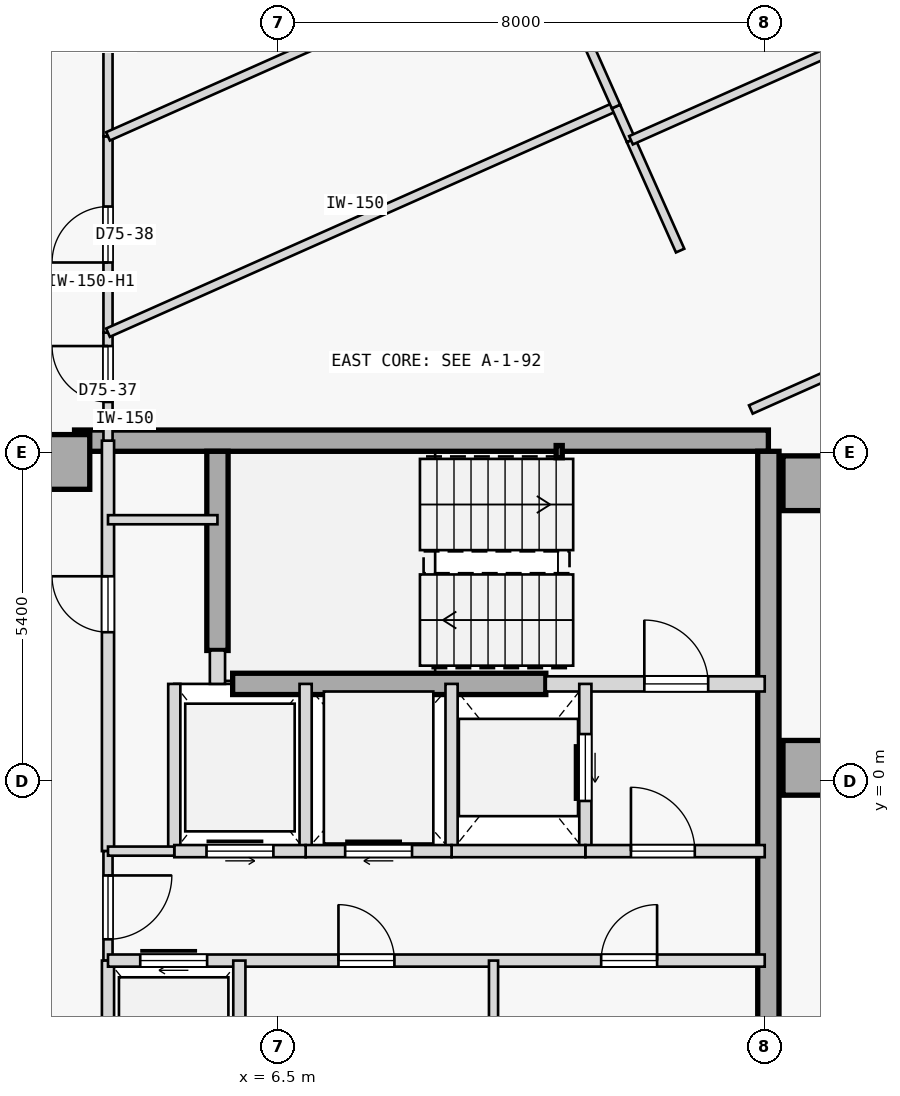
"""IFC4 building model, lengths in metres.
Left out: names, types, materials, properties, quantities, classifications, styles, units other than length and angle.
Written with IfcOpenShell. Run it as: python <this file> out.ifc"""

import sys

from ifc_helpers import new_model, si_unit, direction, frame, frame_2d, origin, origin_2d, place, context, subcontext, project, spatial, rectangle, hollow_rectangle, extrude, element, fill, save


model = new_model("IFC4")
c1 = context("Model", 3, precision=1e-05, world=origin(), true_north=direction((0.0, 1.0)))
c2 = subcontext(c1, "Body", "Model", "MODEL_VIEW")
j1 = project(units=[si_unit("LENGTHUNIT", "METRE"), si_unit("PLANEANGLEUNIT", "RADIAN")], contexts=[c1])
p1 = place(None, origin())
s1 = spatial("IfcSite", under=j1, at=p1, CompositionType="ELEMENT")
p2 = place(p1, origin())
s2 = spatial("IfcBuilding", under=s1, at=p2, CompositionType="ELEMENT")
p3 = place(p2, frame((0.0, 0.0, 281.9)))
s3 = spatial("IfcBuildingStorey", under=s2, at=p3, CompositionType="ELEMENT", Elevation=281.9)
for number, where, z_axis, x_axis in (
    (1, (15.25, 4.9, 0.0), (0.0, 0.0, 1.0), (1.0, 0.0, 0.0)),
    (2, (15.25, 0.22, 0.0), (0.0, 0.0, 1.0), (1.0, 0.0, 0.0)),
    (3, (2.95, 5.25, 0.0), (0.0, 0.0, 1.0), (1.0, 0.0, 0.0)),
):
    element("IfcColumn", number, at=place(p3, frame(where, z_axis=z_axis, x_axis=x_axis)), inside=s3, PredefinedType="COLUMN", context=c2, shape_type="SweptSolid", body=[
        extrude(rectangle(XDim=0.9, YDim=0.9, at=origin_2d()), origin(), (0.0, 0.0, 1.0), 3.35),
    ])
p4 = place(p3, frame((3.15, 5.6, 0.0), z_axis=(0.0, 0.0, 1.0), x_axis=(1.0, 0.0, 0.0)))
e4 = element("IfcWall", 4, at=p4, inside=s3, PredefinedType="SHEAR", context=c2, shape_type="SweptSolid", body=[
    extrude(rectangle(XDim=11.41, YDim=0.35, at=frame_2d((5.705, 0.0))), origin(), (0.0, 0.0, 1.0), 3.125),
])
p5 = place(p3, frame((14.56, -5.425, 0.0), z_axis=(0.0, 0.0, 1.0), x_axis=(0.0, 1.0, 0.0)))
e5 = element("IfcWall", 5, at=p5, inside=s3, PredefinedType="SHEAR", context=c2, shape_type="SweptSolid", body=[
    extrude(rectangle(XDim=10.85, YDim=0.35, at=frame_2d((5.425, 0.0))), origin(), (0.0, 0.0, 1.0), 3.125),
])
p6 = place(p3, frame((5.5, 2.15, 0.0), z_axis=(0.0, 0.0, 1.0), x_axis=(0.0, 1.0, 0.0)))
e6 = element("IfcWall", 6, at=p6, inside=s3, PredefinedType="SHEAR", context=c2, shape_type="SweptSolid", body=[
    extrude(rectangle(XDim=3.275, YDim=0.35, at=frame_2d((1.638, 0.0))), origin(), (0.0, 0.0, 1.0), 3.125),
])
p7 = place(p3, frame((5.75, 1.6, 0.0), z_axis=(0.0, 0.0, 1.0), x_axis=(1.0, 0.0, 0.0)))
e7 = element("IfcWall", 7, at=p7, inside=s3, PredefinedType="SHEAR", context=c2, shape_type="SweptSolid", body=[
    extrude(rectangle(XDim=5.15, YDim=0.35, at=frame_2d((2.575, 0.0))), origin(), (0.0, 0.0, 1.0), 3.125),
])
p8 = place(p3, frame((11.12, 5.42, 0.0), z_axis=(0.0, 0.0, 1.0), x_axis=(1.0, 0.0, 0.0)))
e8 = element("IfcColumn", 8, at=p8, inside=s3, PredefinedType="COLUMN", context=c2, shape_type="SweptSolid", body=[
    extrude(hollow_rectangle(XDim=0.1, YDim=0.2, WallThickness=0.008, at=origin_2d()), origin(), (0.0, 0.0, 1.0), 3.35),
])
p9 = place(p3, frame((10.9, 1.6, 0.0), z_axis=(0.0, 0.0, 1.0), x_axis=(1.0, 0.0, 0.0)))
e9 = element("IfcWall", 9, at=p9, inside=s3, PredefinedType="STANDARD", context=c2, shape_type="SweptSolid", body=[
    extrude(rectangle(XDim=3.6, YDim=0.25, at=frame_2d((1.8, 0.0))), origin(), (0.0, 0.0, 1.0), 3.125),
])
p10 = place(p9, frame((1.62, 0.0, 0.0)))
e10 = element("IfcOpeningElement", 10, at=p10, cuts=e9, PredefinedType="OPENING", context=c2, shape_type="SweptSolid", body=[
    extrude(rectangle(XDim=1.05, YDim=2.15, at=frame_2d((0.525, 1.075))), frame((0.0, 0.135, 0.0), z_axis=(0.0, -1.0, 0.0), x_axis=(1.0, 0.0, 0.0)), (0.0, 0.0, 1.0), 0.27),
])
p11 = place(p3, frame((5.5, 1.6, 0.0), z_axis=(0.0, 0.0, 1.0), x_axis=(0.0, 1.0, 0.0)))
e11 = element("IfcWall", 11, at=p11, inside=s3, PredefinedType="STANDARD", context=c2, shape_type="SweptSolid", body=[
    extrude(rectangle(XDim=0.55, YDim=0.25, at=frame_2d((0.275, 0.0))), origin(), (0.0, 0.0, 1.0), 3.125),
])
p12 = place(p3, frame((3.7, -1.15, 0.0), z_axis=(0.0, 0.0, 1.0), x_axis=(0.0, 1.0, 0.0)))
e12 = element("IfcWall", 12, at=p12, inside=s3, PredefinedType="STANDARD", context=c2, shape_type="SweptSolid", body=[
    extrude(rectangle(XDim=6.75, YDim=0.2, at=frame_2d((3.375, 0.0))), origin(), (0.0, 0.0, 1.0), 3.125),
])
p13 = place(p12, frame((3.6, 0.0, 0.0)))
e13 = element("IfcOpeningElement", 13, at=p13, cuts=e12, PredefinedType="OPENING", context=c2, shape_type="SweptSolid", body=[
    extrude(rectangle(XDim=0.92, YDim=2.15, at=frame_2d((0.46, 1.075))), frame((0.0, 0.11, 0.0), z_axis=(0.0, -1.0, 0.0), x_axis=(1.0, 0.0, 0.0)), (0.0, 0.0, 1.0), 0.22),
])
p14 = place(p3, frame((3.7, -2.95, 0.0), z_axis=(0.0, 0.0, 1.0), x_axis=(0.0, 1.0, 0.0)))
e14 = element("IfcWall", 14, at=p14, inside=s3, PredefinedType="PARTITIONING", context=c2, shape_type="SweptSolid", body=[
    extrude(rectangle(XDim=1.8, YDim=0.15, at=frame_2d((0.9, 0.0))), origin(), (0.0, 0.0, 1.0), 3.125),
])
p15 = place(p14, frame((0.35, 0.0, 0.0)))
e15 = element("IfcOpeningElement", 15, at=p15, cuts=e14, PredefinedType="OPENING", context=c2, shape_type="SweptSolid", body=[
    extrude(rectangle(XDim=1.05, YDim=2.18, at=frame_2d((0.525, 1.09))), frame((0.0, 0.085, 0.0), z_axis=(0.0, -1.0, 0.0), x_axis=(1.0, 0.0, 0.0)), (0.0, 0.0, 1.0), 0.17),
])
p16 = place(p3, frame((3.7, -5.6, 0.0), z_axis=(0.0, 0.0, 1.0), x_axis=(0.0, 1.0, 0.0)))
e16 = element("IfcWall", 16, at=p16, inside=s3, PredefinedType="STANDARD", context=c2, shape_type="SweptSolid", body=[
    extrude(rectangle(XDim=2.65, YDim=0.2, at=frame_2d((1.325, 0.0))), origin(), (0.0, 0.0, 1.0), 3.125),
])
p17 = place(p3, frame((11.55, -1.15, 0.0), z_axis=(0.0, 0.0, 1.0), x_axis=(0.0, 1.0, 0.0)))
e17 = element("IfcWall", 17, at=p17, inside=s3, PredefinedType="STANDARD", context=c2, shape_type="SweptSolid", body=[
    extrude(rectangle(XDim=2.75, YDim=0.2, at=frame_2d((1.375, 0.0))), origin(), (0.0, 0.0, 1.0), 3.125),
])
p18 = place(p17, frame((0.825, 0.0, 0.0)))
e18 = element("IfcOpeningElement", 18, at=p18, cuts=e17, PredefinedType="OPENING", context=c2, shape_type="SweptSolid", body=[
    extrude(rectangle(XDim=1.1, YDim=2.15, at=frame_2d((0.55, 1.075))), frame((0.0, 0.11, 0.0), z_axis=(0.0, -1.0, 0.0), x_axis=(1.0, 0.0, 0.0)), (0.0, 0.0, 1.0), 0.22),
])
p19 = place(p3, frame((9.35, -1.15, 0.0), z_axis=(0.0, 0.0, 1.0), x_axis=(0.0, 1.0, 0.0)))
e19 = element("IfcWall", 19, at=p19, inside=s3, PredefinedType="STANDARD", context=c2, shape_type="SweptSolid", body=[
    extrude(rectangle(XDim=2.75, YDim=0.2, at=frame_2d((1.375, 0.0))), origin(), (0.0, 0.0, 1.0), 3.125),
])
p20 = place(p3, frame((11.55, -1.15, 0.0), z_axis=(0.0, 0.0, 1.0), x_axis=(1.0, 0.0, 0.0)))
e20 = element("IfcWall", 20, at=p20, inside=s3, PredefinedType="STANDARD", context=c2, shape_type="SweptSolid", body=[
    extrude(rectangle(XDim=2.95, YDim=0.2, at=frame_2d((1.475, 0.0))), origin(), (0.0, 0.0, 1.0), 3.125),
])
p21 = place(p20, frame((0.75, 0.0, 0.0)))
e21 = element("IfcOpeningElement", 21, at=p21, cuts=e20, PredefinedType="OPENING", context=c2, shape_type="SweptSolid", body=[
    extrude(rectangle(XDim=1.05, YDim=2.18, at=frame_2d((0.525, 1.09))), frame((0.0, 0.11, 0.0), z_axis=(0.0, -1.0, 0.0), x_axis=(1.0, 0.0, 0.0)), (0.0, 0.0, 1.0), 0.22),
])
p22 = place(p3, frame((9.35, -1.15, 0.0), z_axis=(0.0, 0.0, 1.0), x_axis=(1.0, 0.0, 0.0)))
e22 = element("IfcWall", 22, at=p22, inside=s3, PredefinedType="STANDARD", context=c2, shape_type="SweptSolid", body=[
    extrude(rectangle(XDim=2.2, YDim=0.2, at=frame_2d((1.1, 0.0))), origin(), (0.0, 0.0, 1.0), 3.125),
])
p23 = place(p3, frame((6.95, -1.15, 0.0), z_axis=(0.0, 0.0, 1.0), x_axis=(0.0, 1.0, 0.0)))
e23 = element("IfcWall", 23, at=p23, inside=s3, PredefinedType="STANDARD", context=c2, shape_type="SweptSolid", body=[
    extrude(rectangle(XDim=2.75, YDim=0.2, at=frame_2d((1.375, 0.0))), origin(), (0.0, 0.0, 1.0), 3.125),
])
p24 = place(p3, frame((6.95, -1.15, 0.0), z_axis=(0.0, 0.0, 1.0), x_axis=(1.0, 0.0, 0.0)))
e24 = element("IfcWall", 24, at=p24, inside=s3, PredefinedType="STANDARD", context=c2, shape_type="SweptSolid", body=[
    extrude(rectangle(XDim=2.4, YDim=0.2, at=frame_2d((1.2, 0.0))), origin(), (0.0, 0.0, 1.0), 3.125),
])
p25 = place(p24, frame((0.65, 0.0, 0.0)))
e25 = element("IfcOpeningElement", 25, at=p25, cuts=e24, PredefinedType="OPENING", context=c2, shape_type="SweptSolid", body=[
    extrude(rectangle(XDim=1.1, YDim=2.15, at=frame_2d((0.55, 1.075))), frame((0.0, 0.11, 0.0), z_axis=(0.0, -1.0, 0.0), x_axis=(1.0, 0.0, 0.0)), (0.0, 0.0, 1.0), 0.22),
])
p26 = place(p3, frame((4.79, -1.15, 0.0), z_axis=(0.0, 0.0, 1.0), x_axis=(0.0, 1.0, 0.0)))
e26 = element("IfcWall", 26, at=p26, inside=s3, PredefinedType="STANDARD", context=c2, shape_type="SweptSolid", body=[
    extrude(rectangle(XDim=2.75, YDim=0.2, at=frame_2d((1.375, 0.0))), origin(), (0.0, 0.0, 1.0), 3.125),
])
p27 = place(p3, frame((4.79, -1.15, 0.0), z_axis=(0.0, 0.0, 1.0), x_axis=(1.0, 0.0, 0.0)))
e27 = element("IfcWall", 27, at=p27, inside=s3, PredefinedType="STANDARD", context=c2, shape_type="SweptSolid", body=[
    extrude(rectangle(XDim=2.16, YDim=0.2, at=frame_2d((1.08, 0.0))), origin(), (0.0, 0.0, 1.0), 3.125),
])
p28 = place(p27, frame((0.53, 0.0, 0.0)))
e28 = element("IfcOpeningElement", 28, at=p28, cuts=e27, PredefinedType="OPENING", context=c2, shape_type="SweptSolid", body=[
    extrude(rectangle(XDim=1.1, YDim=2.15, at=frame_2d((0.55, 1.075))), frame((0.0, 0.11, 0.0), z_axis=(0.0, -1.0, 0.0), x_axis=(1.0, 0.0, 0.0)), (0.0, 0.0, 1.0), 0.22),
])
p29 = place(p3, frame((3.7, -1.15, 0.0), z_axis=(0.0, 0.0, 1.0), x_axis=(1.0, 0.0, 0.0)))
e29 = element("IfcWall", 29, at=p29, inside=s3, PredefinedType="PARTITIONING", context=c2, shape_type="SweptSolid", body=[
    extrude(rectangle(XDim=1.09, YDim=0.15, at=frame_2d((0.545, 0.0))), origin(), (0.0, 0.0, 1.0), 3.125),
])
p30 = place(p3, frame((3.7, -2.95, 0.0), z_axis=(0.0, 0.0, 1.0), x_axis=(1.0, 0.0, 0.0)))
e30 = element("IfcWall", 30, at=p30, inside=s3, PredefinedType="STANDARD", context=c2, shape_type="SweptSolid", body=[
    extrude(rectangle(XDim=10.8, YDim=0.2, at=frame_2d((5.4, 0.0))), origin(), (0.0, 0.0, 1.0), 3.125),
])
p31 = place(p30, frame((0.53, 0.0, 0.0)))
e31 = element("IfcOpeningElement", 31, at=p31, cuts=e30, PredefinedType="OPENING", context=c2, shape_type="SweptSolid", body=[
    extrude(rectangle(XDim=1.1, YDim=2.15, at=frame_2d((0.55, 1.075))), frame((0.0, 0.11, 0.0), z_axis=(0.0, -1.0, 0.0), x_axis=(1.0, 0.0, 0.0)), (0.0, 0.0, 1.0), 0.22),
])
p32 = place(p30, frame((3.79, 0.0, 0.0)))
e32 = element("IfcOpeningElement", 32, at=p32, cuts=e30, PredefinedType="OPENING", context=c2, shape_type="SweptSolid", body=[
    extrude(rectangle(XDim=0.92, YDim=2.15, at=frame_2d((0.46, 1.075))), frame((0.0, 0.11, 0.0), z_axis=(0.0, -1.0, 0.0), x_axis=(1.0, 0.0, 0.0)), (0.0, 0.0, 1.0), 0.22),
])
p33 = place(p30, frame((8.11, 0.0, 0.0)))
e33 = element("IfcOpeningElement", 33, at=p33, cuts=e30, PredefinedType="OPENING", context=c2, shape_type="SweptSolid", body=[
    extrude(rectangle(XDim=0.92, YDim=2.15, at=frame_2d((0.46, 1.075))), frame((0.0, 0.11, 0.0), z_axis=(0.0, -1.0, 0.0), x_axis=(1.0, 0.0, 0.0)), (0.0, 0.0, 1.0), 0.22),
])
p34 = place(p3, frame((5.86, -5.6, 0.0), z_axis=(0.0, 0.0, 1.0), x_axis=(0.0, 1.0, 0.0)))
e34 = element("IfcWall", 34, at=p34, inside=s3, PredefinedType="STANDARD", context=c2, shape_type="SweptSolid", body=[
    extrude(rectangle(XDim=2.65, YDim=0.2, at=frame_2d((1.325, 0.0))), origin(), (0.0, 0.0, 1.0), 3.125),
])
p35 = place(p3, frame((10.04, -5.6, 0.0), z_axis=(0.0, 0.0, 1.0), x_axis=(0.0, 1.0, 0.0)))
e35 = element("IfcWall", 35, at=p35, inside=s3, PredefinedType="PARTITIONING", context=c2, shape_type="SweptSolid", body=[
    extrude(rectangle(XDim=2.65, YDim=0.15, at=frame_2d((1.325, 0.0))), origin(), (0.0, 0.0, 1.0), 3.125),
])
p36 = place(p3, frame((3.7, 4.3, 0.0), z_axis=(0.0, 0.0, 1.0), x_axis=(1.0, 0.0, 0.0)))
e36 = element("IfcWall", 36, at=p36, inside=s3, PredefinedType="PARTITIONING", context=c2, shape_type="SweptSolid", body=[
    extrude(rectangle(XDim=1.8, YDim=0.15, at=frame_2d((0.9, 0.0))), origin(), (0.0, 0.0, 1.0), 3.125),
])
p37 = place(p3, frame((3.7, 5.601, 0.0), z_axis=(0.0, 0.0, 1.0), x_axis=(0.0, 1.0, 0.0)))
e37 = element("IfcWall", 37, at=p37, inside=s3, PredefinedType="PARTITIONING", context=c2, shape_type="SweptSolid", body=[
    extrude(rectangle(XDim=1.775, YDim=0.15, at=frame_2d((0.888, 0.0))), origin(), (0.0, 0.0, 1.0), 3.125),
])
p38 = place(p37, frame((0.635, 0.0, 0.0)))
e38 = element("IfcOpeningElement", 38, at=p38, cuts=e37, PredefinedType="OPENING", context=c2, shape_type="SweptSolid", body=[
    extrude(rectangle(XDim=0.92, YDim=2.15, at=frame_2d((0.46, 1.075))), frame((0.0, 0.085, 0.0), z_axis=(0.0, -1.0, 0.0), x_axis=(1.0, 0.0, 0.0)), (0.0, 0.0, 1.0), 0.17),
])
p39 = place(p3, frame((3.7, 7.376, 0.0), z_axis=(0.0, 0.0, 1.0), x_axis=(0.0, 1.0, 0.0)))
e39 = element("IfcWall", 39, at=p39, inside=s3, PredefinedType="PARTITIONING", context=c2, shape_type="SweptSolid", body=[
    extrude(rectangle(XDim=3.228, YDim=0.15, at=frame_2d((1.614, 0.0))), origin(), (0.0, 0.0, 1.0), 2.675),
])
p40 = place(p39, frame((1.154, 0.0, 0.0)))
e40 = element("IfcOpeningElement", 40, at=p40, cuts=e39, PredefinedType="OPENING", context=c2, shape_type="SweptSolid", body=[
    extrude(rectangle(XDim=0.92, YDim=2.15, at=frame_2d((0.46, 1.075))), frame((0.0, 0.085, 0.0), z_axis=(0.0, -1.0, 0.0), x_axis=(1.0, 0.0, 0.0)), (0.0, 0.0, 1.0), 0.17),
])
p41 = place(p3, frame((3.7, 10.604, 0.0), z_axis=(0.0, 0.0, 1.0), x_axis=(-0.000157567161, 0.999999987586, 0.0)))
e41 = element("IfcWall", 41, at=p41, inside=s3, PredefinedType="PARTITIONING", context=c2, shape_type="SweptSolid", body=[
    extrude(rectangle(XDim=3.099, YDim=0.15, at=frame_2d((1.549, 0.0))), origin(), (0.0, 0.0, 1.0), 2.675),
])
p42 = place(p3, frame((3.7, 7.376, 0.0), z_axis=(0.0, 0.0, 1.0), x_axis=(0.91354490899, 0.406737875367, 0.0)))
e42 = element("IfcWall", 42, at=p42, inside=s3, PredefinedType="PARTITIONING", context=c2, shape_type="SweptSolid", body=[
    extrude(rectangle(XDim=9.144, YDim=0.15, at=frame_2d((4.572, 0.0))), origin(), (0.0, 0.0, 1.0), 3.125),
])
p43 = place(p3, frame((13.109, 8.726, 0.0), z_axis=(0.0, 0.0, 1.0), x_axis=(-0.406788519224, 0.913522359128, 0.0)))
e43 = element("IfcWall", 43, at=p43, inside=s3, PredefinedType="PARTITIONING", context=c2, shape_type="SweptSolid", body=[
    extrude(rectangle(XDim=1.986, YDim=0.15, at=frame_2d((0.993, 0.0))), origin(), (0.0, 0.0, 1.0), 3.125),
])
p44 = place(p3, frame((12.301, 10.54, 0.0), z_axis=(0.0, 0.0, 1.0), x_axis=(-0.406436552015, 0.913679007741, 0.0)))
e44 = element("IfcWall", 44, at=p44, inside=s3, PredefinedType="PARTITIONING", context=c2, shape_type="SweptSolid", body=[
    extrude(rectangle(XDim=0.608, YDim=0.15, at=frame_2d((0.304, 0.0))), origin(), (0.0, 0.0, 1.0), 3.125),
])
p45 = place(p3, frame((3.7, 10.604, 0.0), z_axis=(0.0, 0.0, 1.0), x_axis=(0.913534926439, 0.406760295722, 0.0)))
e45 = element("IfcWall", 45, at=p45, inside=s3, PredefinedType="PARTITIONING", context=c2, shape_type="SweptSolid", body=[
    extrude(rectangle(XDim=7.831, YDim=0.15, at=frame_2d((3.916, 0.0))), origin(), (0.0, 0.0, 1.0), 3.125),
])
p46 = place(p3, frame((12.054, 11.095, 0.0), z_axis=(0.0, 0.0, 1.0), x_axis=(-0.406798922371, 0.91351772657, 0.0)))
e46 = element("IfcWall", 46, at=p46, inside=s3, PredefinedType="PARTITIONING", context=c2, shape_type="SweptSolid", body=[
    extrude(rectangle(XDim=2.949, YDim=0.15, at=frame_2d((1.475, 0.0))), origin(), (0.0, 0.0, 1.0), 3.125),
])
p47 = place(p3, frame((14.272, 6.113, 0.0), z_axis=(0.0, 0.0, 1.0), x_axis=(0.913551014388, 0.406724162191, 0.0)))
e47 = element("IfcWall", 47, at=p47, inside=s3, PredefinedType="PARTITIONING", context=c2, shape_type="SweptSolid", body=[
    extrude(rectangle(XDim=14.192, YDim=0.15, at=frame_2d((7.096, 0.0))), origin(), (0.0, 0.0, 1.0), 3.125),
])
p48 = place(p47, frame((6.636, 0.0, 0.0)))
e48 = element("IfcOpeningElement", 48, at=p48, cuts=e47, PredefinedType="OPENING", context=c2, shape_type="SweptSolid", body=[
    extrude(rectangle(XDim=0.92, YDim=2.15, at=frame_2d((0.46, 1.075))), frame((0.0, 0.085, 0.0), z_axis=(0.0, -1.0, 0.0), x_axis=(1.0, 0.0, 0.0)), (0.0, 0.0, 1.0), 0.17),
])
p49 = place(p3, frame((12.301, 10.54, 0.0), z_axis=(0.0, 0.0, 1.0), x_axis=(0.913544622417, 0.406738519018, 0.0)))
e49 = element("IfcWall", 49, at=p49, inside=s3, PredefinedType="PARTITIONING", context=c2, shape_type="SweptSolid", body=[
    extrude(rectangle(XDim=14.192, YDim=0.15, at=frame_2d((7.096, 0.0))), origin(), (0.0, 0.0, 1.0), 2.675),
])
p50 = place(p49, frame((6.636, 0.0, 0.0)))
e50 = element("IfcOpeningElement", 50, at=p50, cuts=e49, PredefinedType="OPENING", context=c2, shape_type="SweptSolid", body=[
    extrude(rectangle(XDim=0.92, YDim=2.15, at=frame_2d((0.46, 1.075))), frame((0.0, 0.085, 0.0), z_axis=(0.0, -1.0, 0.0), x_axis=(1.0, 0.0, 0.0)), (0.0, 0.0, 1.0), 0.17),
])
p51 = place(p10, origin())
e51 = element("IfcDoor", 51, at=p51, inside=s3, OperationType="SINGLE_SWING_LEFT", PredefinedType="DOOR", context=c2, shape_type="SweptSolid", body=[
    extrude(rectangle(XDim=1.05, YDim=2.15, at=frame_2d((0.525, 1.075))), frame((0.0, 0.025, 0.0), z_axis=(0.0, -1.0, 0.0), x_axis=(1.0, 0.0, 0.0)), (0.0, 0.0, 1.0), 0.05),
])
fill(e10, e51)
p52 = place(p21, origin())
e52 = element("IfcDoor", 52, at=p52, inside=s3, OperationType="SINGLE_SWING_LEFT", PredefinedType="DOOR", context=c2, shape_type="SweptSolid", body=[
    extrude(rectangle(XDim=1.05, YDim=2.18, at=frame_2d((0.525, 1.09))), frame((0.0, 0.025, 0.0), z_axis=(0.0, -1.0, 0.0), x_axis=(1.0, 0.0, 0.0)), (0.0, 0.0, 1.0), 0.05),
])
fill(e21, e52)
p53 = place(p15, frame((1.05, 0.0, 0.0), z_axis=(0.0, 0.0, 1.0), x_axis=(-1.0, 0.0, 0.0)))
e53 = element("IfcDoor", 53, at=p53, inside=s3, OperationType="SINGLE_SWING_RIGHT", PredefinedType="DOOR", context=c2, shape_type="SweptSolid", body=[
    extrude(rectangle(XDim=1.05, YDim=2.18, at=frame_2d((0.525, 1.09))), frame((0.0, 0.025, 0.0), z_axis=(0.0, -1.0, 0.0), x_axis=(1.0, 0.0, 0.0)), (0.0, 0.0, 1.0), 0.05),
])
fill(e15, e53)
p54 = place(p18, origin())
e54 = element("IfcDoor", 54, at=p54, inside=s3, OperationType="SLIDING_TO_RIGHT", PredefinedType="DOOR", context=c2, shape_type="SweptSolid", body=[
    extrude(rectangle(XDim=1.1, YDim=2.15, at=frame_2d((0.55, 1.075))), frame((0.0, 0.025, 0.0), z_axis=(0.0, -1.0, 0.0), x_axis=(1.0, 0.0, 0.0)), (0.0, 0.0, 1.0), 0.05),
])
fill(e18, e54)
p55 = place(p25, origin())
e55 = element("IfcDoor", 55, at=p55, inside=s3, OperationType="SLIDING_TO_RIGHT", PredefinedType="DOOR", context=c2, shape_type="SweptSolid", body=[
    extrude(rectangle(XDim=1.1, YDim=2.15, at=frame_2d((0.55, 1.075))), frame((0.0, 0.025, 0.0), z_axis=(0.0, -1.0, 0.0), x_axis=(1.0, 0.0, 0.0)), (0.0, 0.0, 1.0), 0.05),
])
fill(e25, e55)
p56 = place(p28, origin())
e56 = element("IfcDoor", 56, at=p56, inside=s3, OperationType="SLIDING_TO_LEFT", PredefinedType="DOOR", context=c2, shape_type="SweptSolid", body=[
    extrude(rectangle(XDim=1.1, YDim=2.15, at=frame_2d((0.55, 1.075))), frame((0.0, 0.025, 0.0), z_axis=(0.0, -1.0, 0.0), x_axis=(1.0, 0.0, 0.0)), (0.0, 0.0, 1.0), 0.05),
])
fill(e28, e56)
p57 = place(p31, origin())
e57 = element("IfcDoor", 57, at=p57, inside=s3, OperationType="SLIDING_TO_RIGHT", PredefinedType="DOOR", context=c2, shape_type="SweptSolid", body=[
    extrude(rectangle(XDim=1.1, YDim=2.15, at=frame_2d((0.55, 1.075))), frame((0.0, 0.025, 0.0), z_axis=(0.0, -1.0, 0.0), x_axis=(1.0, 0.0, 0.0)), (0.0, 0.0, 1.0), 0.05),
])
fill(e31, e57)
p58 = place(p32, origin())
e58 = element("IfcDoor", 58, at=p58, inside=s3, OperationType="SINGLE_SWING_LEFT", PredefinedType="DOOR", context=c2, shape_type="SweptSolid", body=[
    extrude(rectangle(XDim=0.92, YDim=2.15, at=frame_2d((0.46, 1.075))), frame((0.0, 0.025, 0.0), z_axis=(0.0, -1.0, 0.0), x_axis=(1.0, 0.0, 0.0)), (0.0, 0.0, 1.0), 0.05),
])
fill(e32, e58)
p59 = place(p33, origin())
e59 = element("IfcDoor", 59, at=p59, inside=s3, OperationType="SINGLE_SWING_RIGHT", PredefinedType="DOOR", context=c2, shape_type="SweptSolid", body=[
    extrude(rectangle(XDim=0.92, YDim=2.15, at=frame_2d((0.46, 1.075))), frame((0.0, 0.025, 0.0), z_axis=(0.0, -1.0, 0.0), x_axis=(1.0, 0.0, 0.0)), (0.0, 0.0, 1.0), 0.05),
])
fill(e33, e59)
p60 = place(p13, origin())
e60 = element("IfcDoor", 60, at=p60, inside=s3, OperationType="SINGLE_SWING_RIGHT", PredefinedType="DOOR", context=c2, shape_type="SweptSolid", body=[
    extrude(rectangle(XDim=0.92, YDim=2.15, at=frame_2d((0.46, 1.075))), frame((0.0, 0.025, 0.0), z_axis=(0.0, -1.0, 0.0), x_axis=(1.0, 0.0, 0.0)), (0.0, 0.0, 1.0), 0.05),
])
fill(e13, e60)
p61 = place(p38, origin())
e61 = element("IfcDoor", 61, at=p61, inside=s3, OperationType="SINGLE_SWING_RIGHT", PredefinedType="DOOR", context=c2, shape_type="SweptSolid", body=[
    extrude(rectangle(XDim=0.92, YDim=2.15, at=frame_2d((0.46, 1.075))), frame((0.0, 0.025, 0.0), z_axis=(0.0, -1.0, 0.0), x_axis=(1.0, 0.0, 0.0)), (0.0, 0.0, 1.0), 0.05),
])
fill(e38, e61)
p62 = place(p40, origin())
e62 = element("IfcDoor", 62, at=p62, inside=s3, OperationType="SINGLE_SWING_LEFT", PredefinedType="DOOR", context=c2, shape_type="SweptSolid", body=[
    extrude(rectangle(XDim=0.92, YDim=2.15, at=frame_2d((0.46, 1.075))), frame((0.0, 0.025, 0.0), z_axis=(0.0, -1.0, 0.0), x_axis=(1.0, 0.0, 0.0)), (0.0, 0.0, 1.0), 0.05),
])
fill(e40, e62)
save(model, sys.argv[1])
